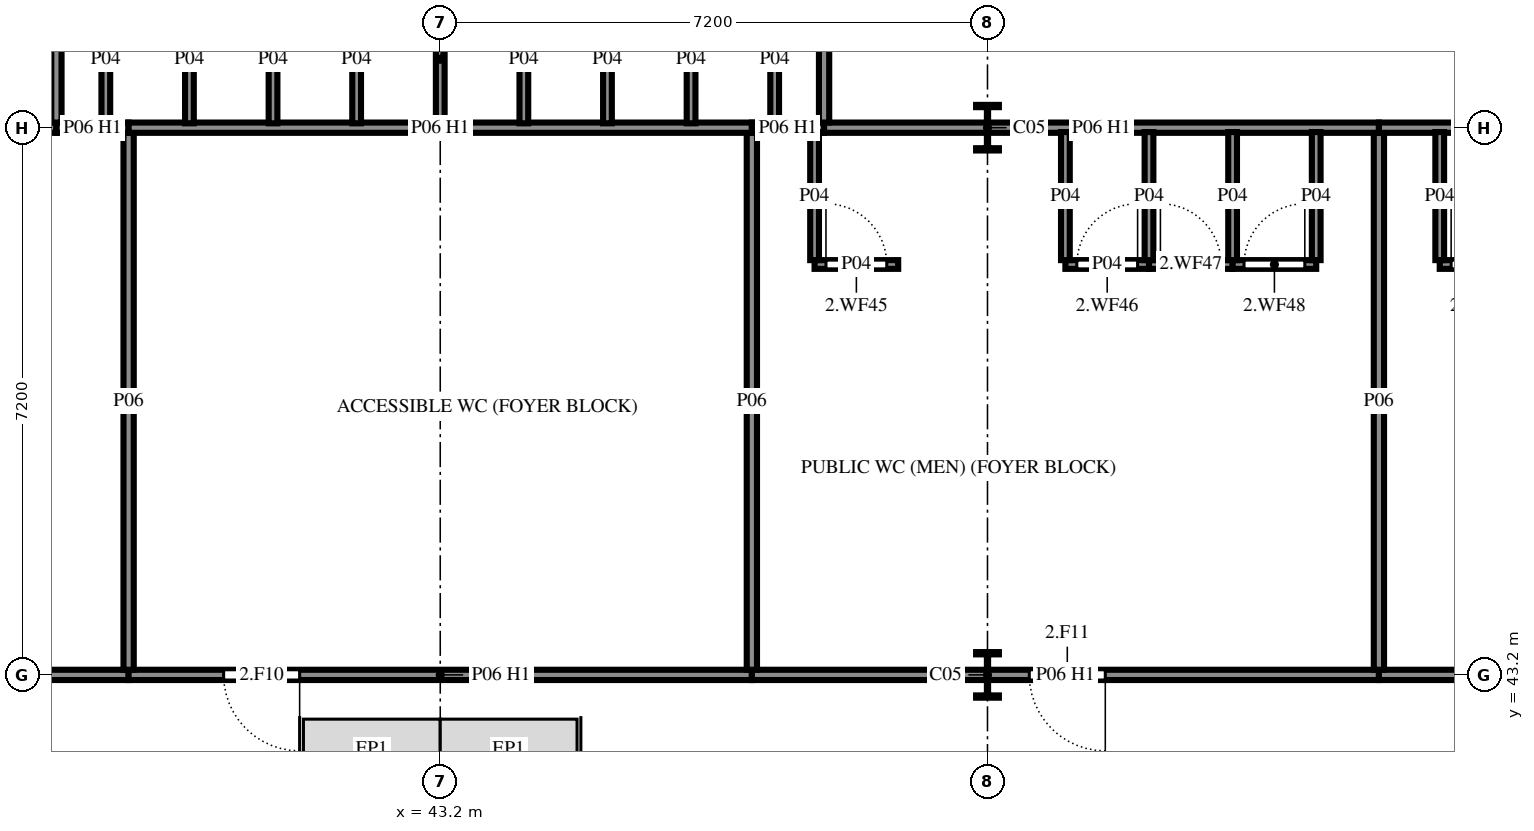
"""IFC4 building model, lengths in metres.
Left out: names, types, materials, properties, quantities, classifications, styles, units other than length and angle.
Written with IfcOpenShell. Run it as: python <this file> out.ifc"""

import sys

from ifc_helpers import new_model, si_unit, direction, frame, frame_2d, origin, origin_2d, place, context, subcontext, project, spatial, rectangle, i_section, extrude, element, fill, save


model = new_model("IFC4")
c1 = context("Model", 3, precision=1e-05, world=origin(), true_north=direction((0.0, 1.0)))
c2 = subcontext(c1, "Body", "Model", "MODEL_VIEW")
j1 = project(units=[si_unit("LENGTHUNIT", "METRE"), si_unit("PLANEANGLEUNIT", "RADIAN")], contexts=[c1])
p1 = place(None, origin())
s1 = spatial("IfcSite", under=j1, at=p1, CompositionType="ELEMENT")
p2 = place(p1, origin())
s2 = spatial("IfcBuilding", under=s1, at=p2, CompositionType="ELEMENT")
p3 = place(p2, frame((0.0, 0.0, 7.2)))
s3 = spatial("IfcBuildingStorey", under=s2, at=p3, CompositionType="ELEMENT", Elevation=7.2)
for number, where, z_axis, x_axis in (
    (1, (50.4, 43.2, 0.0), (0.0, 0.0, 1.0), (1.0, 0.0, 0.0)),
    (2, (50.4, 50.4, 0.0), (0.0, 0.0, 1.0), (1.0, 0.0, 0.0)),
):
    element("IfcColumn", number, at=place(p3, frame(where, z_axis=z_axis, x_axis=x_axis)), inside=s3, PredefinedType="COLUMN", context=c2, shape_type="SweptSolid", body=[
        extrude(i_section(OverallWidth=0.3, OverallDepth=0.6, WebThickness=0.015, FlangeThickness=0.03, FilletRadius=0.027, at=origin_2d()), origin(), (0.0, 0.0, 1.0), 3.6),
    ])
p4 = place(p3, frame((30.85, 43.2, 0.0), z_axis=(0.0, 0.0, 1.0), x_axis=(1.0, 0.0, 0.0)))
e3 = element("IfcWall", 3, at=p4, inside=s3, PredefinedType="PARTITIONING", context=c2, shape_type="SweptSolid", body=[
    extrude(rectangle(XDim=8.25, YDim=0.135, at=frame_2d((4.125, 0.0))), origin(), (0.0, 0.0, 1.0), 2.82),
])
p5 = place(p4, frame((3.65, 0.0, 0.0)))
e4 = element("IfcOpeningElement", 4, at=p5, cuts=e3, PredefinedType="OPENING", context=c2, shape_type="SweptSolid", body=[
    extrude(rectangle(XDim=1.0, YDim=2.4, at=frame_2d((0.5, 1.2))), frame((0.0, 0.077, 0.0), z_axis=(0.0, -1.0, 0.0), x_axis=(1.0, 0.0, 0.0)), (0.0, 0.0, 1.0), 0.155),
])
p6 = place(p3, frame((39.1, 43.2, 0.0), z_axis=(0.0, 0.0, 1.0), x_axis=(1.0, 0.0, 0.0)))
e5 = element("IfcWall", 5, at=p6, inside=s3, PredefinedType="PARTITIONING", context=c2, shape_type="SweptSolid", body=[
    extrude(rectangle(XDim=8.2, YDim=0.135, at=frame_2d((4.1, 0.0))), origin(), (0.0, 0.0, 1.0), 2.82),
])
p7 = place(p6, frame((1.25, 0.0, 0.0)))
e6 = element("IfcOpeningElement", 6, at=p7, cuts=e5, PredefinedType="OPENING", context=c2, shape_type="SweptSolid", body=[
    extrude(rectangle(XDim=1.0, YDim=2.4, at=frame_2d((0.5, 1.2))), frame((0.0, 0.077, 0.0), z_axis=(0.0, -1.0, 0.0), x_axis=(1.0, 0.0, 0.0)), (0.0, 0.0, 1.0), 0.155),
])
p8 = place(p3, frame((47.3, 43.2, 0.0), z_axis=(0.0, 0.0, 1.0), x_axis=(1.0, 0.0, 0.0)))
e7 = element("IfcWall", 7, at=p8, inside=s3, PredefinedType="PARTITIONING", context=c2, shape_type="SweptSolid", body=[
    extrude(rectangle(XDim=8.25, YDim=0.135, at=frame_2d((4.125, 0.0))), origin(), (0.0, 0.0, 1.0), 2.82),
])
p9 = place(p8, frame((3.65, 0.0, 0.0)))
e8 = element("IfcOpeningElement", 8, at=p9, cuts=e7, PredefinedType="OPENING", context=c2, shape_type="SweptSolid", body=[
    extrude(rectangle(XDim=1.0, YDim=2.4, at=frame_2d((0.5, 1.2))), frame((0.0, 0.077, 0.0), z_axis=(0.0, -1.0, 0.0), x_axis=(1.0, 0.0, 0.0)), (0.0, 0.0, 1.0), 0.155),
])
p10 = place(p3, frame((55.55, 43.2, 0.0), z_axis=(0.0, 0.0, 1.0), x_axis=(1.0, 0.0, 0.0)))
e9 = element("IfcWall", 9, at=p10, inside=s3, PredefinedType="PARTITIONING", context=c2, shape_type="SweptSolid", body=[
    extrude(rectangle(XDim=8.2, YDim=0.135, at=frame_2d((4.1, 0.0))), origin(), (0.0, 0.0, 1.0), 2.82),
])
p11 = place(p10, frame((3.65, 0.0, 0.0)))
e10 = element("IfcOpeningElement", 10, at=p11, cuts=e9, PredefinedType="OPENING", context=c2, shape_type="SweptSolid", body=[
    extrude(rectangle(XDim=1.0, YDim=2.4, at=frame_2d((0.5, 1.2))), frame((0.0, 0.077, 0.0), z_axis=(0.0, -1.0, 0.0), x_axis=(1.0, 0.0, 0.0)), (0.0, 0.0, 1.0), 0.155),
])
p12 = place(p3, frame((39.1, 50.333, 0.0), z_axis=(0.0, 0.0, 1.0), x_axis=(0.0, -1.0, 0.0)))
e11 = element("IfcWall", 11, at=p12, inside=s3, PredefinedType="PARTITIONING", context=c2, shape_type="SweptSolid", body=[
    extrude(rectangle(XDim=7.065, YDim=0.135, at=frame_2d((3.532, 0.0))), origin(), (0.0, 0.0, 1.0), 3.42),
])
p13 = place(p3, frame((30.85, 50.4, 0.0), z_axis=(0.0, 0.0, 1.0), x_axis=(1.0, 0.0, 0.0)))
e12 = element("IfcWall", 12, at=p13, inside=s3, PredefinedType="PARTITIONING", context=c2, shape_type="SweptSolid", body=[
    extrude(rectangle(XDim=7.3, YDim=0.135, at=frame_2d((3.65, 0.0))), origin(), (0.0, 0.0, 1.0), 2.82),
])
p14 = place(p3, frame((38.15, 50.4, 0.0), z_axis=(0.0, 0.0, 1.0), x_axis=(1.0, 0.0, 0.0)))
e13 = element("IfcWall", 13, at=p14, inside=s3, PredefinedType="PARTITIONING", context=c2, shape_type="SweptSolid", body=[
    extrude(rectangle(XDim=0.95, YDim=0.135, at=frame_2d((0.475, 0.0))), origin(), (0.0, 0.0, 1.0), 2.82),
])
p15 = place(p3, frame((47.3, 50.333, 0.0), z_axis=(0.0, 0.0, 1.0), x_axis=(0.0, -1.0, 0.0)))
e14 = element("IfcWall", 14, at=p15, inside=s3, PredefinedType="PARTITIONING", context=c2, shape_type="SweptSolid", body=[
    extrude(rectangle(XDim=7.065, YDim=0.135, at=frame_2d((3.532, 0.0))), origin(), (0.0, 0.0, 1.0), 3.42),
])
p16 = place(p3, frame((39.1, 50.4, 0.0), z_axis=(0.0, 0.0, 1.0), x_axis=(1.0, 0.0, 0.0)))
e15 = element("IfcWall", 15, at=p16, inside=s3, PredefinedType="PARTITIONING", context=c2, shape_type="SweptSolid", body=[
    extrude(rectangle(XDim=8.2, YDim=0.135, at=frame_2d((4.1, 0.0))), origin(), (0.0, 0.0, 1.0), 2.82),
])
p17 = place(p3, frame((55.55, 50.333, 0.0), z_axis=(0.0, 0.0, 1.0), x_axis=(0.0, -1.0, 0.0)))
e16 = element("IfcWall", 16, at=p17, inside=s3, PredefinedType="PARTITIONING", context=c2, shape_type="SweptSolid", body=[
    extrude(rectangle(XDim=7.065, YDim=0.135, at=frame_2d((3.532, 0.0))), origin(), (0.0, 0.0, 1.0), 3.42),
])
p18 = place(p3, frame((47.3, 50.4, 0.0), z_axis=(0.0, 0.0, 1.0), x_axis=(1.0, 0.0, 0.0)))
e17 = element("IfcWall", 17, at=p18, inside=s3, PredefinedType="PARTITIONING", context=c2, shape_type="SweptSolid", body=[
    extrude(rectangle(XDim=0.95, YDim=0.135, at=frame_2d((0.475, 0.0))), origin(), (0.0, 0.0, 1.0), 2.82),
])
p19 = place(p3, frame((48.25, 50.4, 0.0), z_axis=(0.0, 0.0, 1.0), x_axis=(1.0, 0.0, 0.0)))
e18 = element("IfcWall", 18, at=p19, inside=s3, PredefinedType="PARTITIONING", context=c2, shape_type="SweptSolid", body=[
    extrude(rectangle(XDim=7.3, YDim=0.135, at=frame_2d((3.65, 0.0))), origin(), (0.0, 0.0, 1.0), 2.82),
])
p20 = place(p3, frame((55.55, 50.4, 0.0), z_axis=(0.0, 0.0, 1.0), x_axis=(1.0, 0.0, 0.0)))
e19 = element("IfcWall", 19, at=p20, inside=s3, PredefinedType="PARTITIONING", context=c2, shape_type="SweptSolid", body=[
    extrude(rectangle(XDim=2.75, YDim=0.135, at=frame_2d((1.375, 0.0))), origin(), (0.0, 0.0, 1.0), 2.82),
])
for number, where, z_axis, x_axis in (
    (20, (38.15, 58.133, 0.0), (0.0, 0.0, 1.0), (0.0, -1.0, 0.0)),
    (21, (48.25, 58.133, 0.0), (0.0, 0.0, 1.0), (0.0, -1.0, 0.0)),
):
    element("IfcWall", number, at=place(p3, frame(where, z_axis=z_axis, x_axis=x_axis)), inside=s3, PredefinedType="PARTITIONING", context=c2, shape_type="SweptSolid", body=[
        extrude(rectangle(XDim=7.665, YDim=0.135, at=frame_2d((3.833, 0.0))), origin(), (0.0, 0.0, 1.0), 3.42),
    ])
p21 = place(p3, frame((48.125, 48.6, 0.0), z_axis=(0.0, 0.0, 1.0), x_axis=(1.0, 0.0, 0.0)))
e22 = element("IfcWall", 22, at=p21, inside=s3, PredefinedType="PARTITIONING", context=c2, shape_type="SweptSolid", body=[
    extrude(rectangle(XDim=1.1, YDim=0.115, at=frame_2d((0.55, 0.0))), origin(), (0.0, 0.0, 1.0), 3.42),
])
p22 = place(p21, frame((0.15, 0.0, 0.0)))
e23 = element("IfcOpeningElement", 23, at=p22, cuts=e22, PredefinedType="OPENING", context=c2, shape_type="SweptSolid", body=[
    extrude(rectangle(XDim=0.8, YDim=2.1, at=frame_2d((0.4, 1.05))), frame((0.0, 0.067, 0.0), z_axis=(0.0, -1.0, 0.0), x_axis=(1.0, 0.0, 0.0)), (0.0, 0.0, 1.0), 0.135),
])
p23 = place(p3, frame((48.125, 50.343, 0.0), z_axis=(0.0, 0.0, 1.0), x_axis=(0.0, -1.0, 0.0)))
e24 = element("IfcWall", 24, at=p23, inside=s3, PredefinedType="PARTITIONING", context=c2, shape_type="SweptSolid", body=[
    extrude(rectangle(XDim=1.685, YDim=0.115, at=frame_2d((0.843, 0.0))), origin(), (0.0, 0.0, 1.0), 3.42),
])
p24 = place(p3, frame((51.425, 48.6, 0.0), z_axis=(0.0, 0.0, 1.0), x_axis=(1.0, 0.0, 0.0)))
e25 = element("IfcWall", 25, at=p24, inside=s3, PredefinedType="PARTITIONING", context=c2, shape_type="SweptSolid", body=[
    extrude(rectangle(XDim=1.1, YDim=0.115, at=frame_2d((0.55, 0.0))), origin(), (0.0, 0.0, 1.0), 3.42),
])
p25 = place(p24, frame((0.15, 0.0, 0.0)))
e26 = element("IfcOpeningElement", 26, at=p25, cuts=e25, PredefinedType="OPENING", context=c2, shape_type="SweptSolid", body=[
    extrude(rectangle(XDim=0.8, YDim=2.1, at=frame_2d((0.4, 1.05))), frame((0.0, 0.067, 0.0), z_axis=(0.0, -1.0, 0.0), x_axis=(1.0, 0.0, 0.0)), (0.0, 0.0, 1.0), 0.135),
])
p26 = place(p3, frame((51.425, 50.343, 0.0), z_axis=(0.0, 0.0, 1.0), x_axis=(0.0, -1.0, 0.0)))
e27 = element("IfcWall", 27, at=p26, inside=s3, PredefinedType="PARTITIONING", context=c2, shape_type="SweptSolid", body=[
    extrude(rectangle(XDim=1.685, YDim=0.115, at=frame_2d((0.843, 0.0))), origin(), (0.0, 0.0, 1.0), 3.42),
])
p27 = place(p3, frame((52.525, 48.6, 0.0), z_axis=(0.0, 0.0, 1.0), x_axis=(1.0, 0.0, 0.0)))
e28 = element("IfcWall", 28, at=p27, inside=s3, PredefinedType="PARTITIONING", context=c2, shape_type="SweptSolid", body=[
    extrude(rectangle(XDim=1.1, YDim=0.115, at=frame_2d((0.55, 0.0))), origin(), (0.0, 0.0, 1.0), 3.42),
])
p28 = place(p27, frame((0.15, 0.0, 0.0)))
e29 = element("IfcOpeningElement", 29, at=p28, cuts=e28, PredefinedType="OPENING", context=c2, shape_type="SweptSolid", body=[
    extrude(rectangle(XDim=0.8, YDim=2.1, at=frame_2d((0.4, 1.05))), frame((0.0, 0.067, 0.0), z_axis=(0.0, -1.0, 0.0), x_axis=(1.0, 0.0, 0.0)), (0.0, 0.0, 1.0), 0.135),
])
p29 = place(p3, frame((52.525, 50.343, 0.0), z_axis=(0.0, 0.0, 1.0), x_axis=(0.0, -1.0, 0.0)))
e30 = element("IfcWall", 30, at=p29, inside=s3, PredefinedType="PARTITIONING", context=c2, shape_type="SweptSolid", body=[
    extrude(rectangle(XDim=1.685, YDim=0.115, at=frame_2d((0.843, 0.0))), origin(), (0.0, 0.0, 1.0), 3.42),
])
p30 = place(p3, frame((53.625, 48.6, 0.0), z_axis=(0.0, 0.0, 1.0), x_axis=(1.0, 0.0, 0.0)))
e31 = element("IfcWall", 31, at=p30, inside=s3, PredefinedType="PARTITIONING", context=c2, shape_type="SweptSolid", body=[
    extrude(rectangle(XDim=1.1, YDim=0.115, at=frame_2d((0.55, 0.0))), origin(), (0.0, 0.0, 1.0), 3.42),
])
p31 = place(p30, frame((0.15, 0.0, 0.0)))
e32 = element("IfcOpeningElement", 32, at=p31, cuts=e31, PredefinedType="OPENING", context=c2, shape_type="SweptSolid", body=[
    extrude(rectangle(XDim=0.8, YDim=2.1, at=frame_2d((0.4, 1.05))), frame((0.0, 0.067, 0.0), z_axis=(0.0, -1.0, 0.0), x_axis=(1.0, 0.0, 0.0)), (0.0, 0.0, 1.0), 0.135),
])
for number, where, z_axis, x_axis in (
    (33, (53.625, 50.343, 0.0), (0.0, 0.0, 1.0), (0.0, -1.0, 0.0)),
    (34, (54.725, 50.343, 0.0), (0.0, 0.0, 1.0), (0.0, -1.0, 0.0)),
):
    element("IfcWall", number, at=place(p3, frame(where, z_axis=z_axis, x_axis=x_axis)), inside=s3, PredefinedType="PARTITIONING", context=c2, shape_type="SweptSolid", body=[
        extrude(rectangle(XDim=1.685, YDim=0.115, at=frame_2d((0.843, 0.0))), origin(), (0.0, 0.0, 1.0), 3.42),
    ])
p32 = place(p3, frame((56.35, 48.6, 0.0), z_axis=(0.0, 0.0, 1.0), x_axis=(1.0, 0.0, 0.0)))
e35 = element("IfcWall", 35, at=p32, inside=s3, PredefinedType="PARTITIONING", context=c2, shape_type="SweptSolid", body=[
    extrude(rectangle(XDim=1.1, YDim=0.115, at=frame_2d((0.55, 0.0))), origin(), (0.0, 0.0, 1.0), 3.42),
])
p33 = place(p32, frame((0.15, 0.0, 0.0)))
e36 = element("IfcOpeningElement", 36, at=p33, cuts=e35, PredefinedType="OPENING", context=c2, shape_type="SweptSolid", body=[
    extrude(rectangle(XDim=0.8, YDim=2.1, at=frame_2d((0.4, 1.05))), frame((0.0, 0.067, 0.0), z_axis=(0.0, -1.0, 0.0), x_axis=(1.0, 0.0, 0.0)), (0.0, 0.0, 1.0), 0.135),
])
for number, where, z_axis, x_axis in (
    (37, (56.35, 50.343, 0.0), (0.0, 0.0, 1.0), (0.0, -1.0, 0.0)),
    (38, (38.8, 50.458, 0.0), (0.0, 0.0, 1.0), (0.0, 1.0, 0.0)),
    (39, (39.9, 50.458, 0.0), (0.0, 0.0, 1.0), (0.0, 1.0, 0.0)),
    (40, (41.0, 50.458, 0.0), (0.0, 0.0, 1.0), (0.0, 1.0, 0.0)),
    (41, (42.1, 50.458, 0.0), (0.0, 0.0, 1.0), (0.0, 1.0, 0.0)),
):
    element("IfcWall", number, at=place(p3, frame(where, z_axis=z_axis, x_axis=x_axis)), inside=s3, PredefinedType="PARTITIONING", context=c2, shape_type="SweptSolid", body=[
        extrude(rectangle(XDim=1.685, YDim=0.115, at=frame_2d((0.843, 0.0))), origin(), (0.0, 0.0, 1.0), 3.42),
    ])
p34 = place(p3, frame((43.2, 50.458, 0.0), z_axis=(0.0, 0.0, 1.0), x_axis=(0.0, 1.0, 0.0)))
e42 = element("IfcWall", 42, at=p34, inside=s3, PredefinedType="PARTITIONING", context=c2, shape_type="SweptSolid", body=[
    extrude(rectangle(XDim=1.685, YDim=0.115, at=frame_2d((0.843, 0.0))), origin(), (0.0, 0.0, 1.0), 3.12),
])
for number, where, z_axis, x_axis in (
    (43, (44.3, 50.458, 0.0), (0.0, 0.0, 1.0), (0.0, 1.0, 0.0)),
    (44, (45.4, 50.458, 0.0), (0.0, 0.0, 1.0), (0.0, 1.0, 0.0)),
    (45, (46.5, 50.458, 0.0), (0.0, 0.0, 1.0), (0.0, 1.0, 0.0)),
    (46, (47.6, 50.458, 0.0), (0.0, 0.0, 1.0), (0.0, 1.0, 0.0)),
):
    element("IfcWall", number, at=place(p3, frame(where, z_axis=z_axis, x_axis=x_axis)), inside=s3, PredefinedType="PARTITIONING", context=c2, shape_type="SweptSolid", body=[
        extrude(rectangle(XDim=1.685, YDim=0.115, at=frame_2d((0.843, 0.0))), origin(), (0.0, 0.0, 1.0), 3.42),
    ])
p35 = place(p7, frame((1.0, 0.0, 0.0), z_axis=(0.0, 0.0, 1.0), x_axis=(-1.0, 0.0, 0.0)))
e47 = element("IfcDoor", 47, at=p35, inside=s3, OperationType="SINGLE_SWING_RIGHT", PredefinedType="DOOR", context=c2, shape_type="SweptSolid", body=[
    extrude(rectangle(XDim=1.0, YDim=2.4, at=frame_2d((0.5, 1.2))), frame((0.0, 0.025, 0.0), z_axis=(0.0, -1.0, 0.0), x_axis=(1.0, 0.0, 0.0)), (0.0, 0.0, 1.0), 0.05),
])
fill(e6, e47)
p36 = place(p9, frame((1.0, 0.0, 0.0), z_axis=(0.0, 0.0, 1.0), x_axis=(-1.0, 0.0, 0.0)))
e48 = element("IfcDoor", 48, at=p36, inside=s3, OperationType="SINGLE_SWING_RIGHT", PredefinedType="DOOR", context=c2, shape_type="SweptSolid", body=[
    extrude(rectangle(XDim=1.0, YDim=2.4, at=frame_2d((0.5, 1.2))), frame((0.0, 0.025, 0.0), z_axis=(0.0, -1.0, 0.0), x_axis=(1.0, 0.0, 0.0)), (0.0, 0.0, 1.0), 0.05),
])
fill(e8, e48)
p37 = place(p22, origin())
e49 = element("IfcDoor", 49, at=p37, inside=s3, OperationType="SINGLE_SWING_RIGHT", PredefinedType="DOOR", context=c2, shape_type="SweptSolid", body=[
    extrude(rectangle(XDim=0.8, YDim=2.1, at=frame_2d((0.4, 1.05))), frame((0.0, 0.025, 0.0), z_axis=(0.0, -1.0, 0.0), x_axis=(1.0, 0.0, 0.0)), (0.0, 0.0, 1.0), 0.05),
])
fill(e23, e49)
p38 = place(p25, origin())
e50 = element("IfcDoor", 50, at=p38, inside=s3, OperationType="SINGLE_SWING_LEFT", PredefinedType="DOOR", context=c2, shape_type="SweptSolid", body=[
    extrude(rectangle(XDim=0.8, YDim=2.1, at=frame_2d((0.4, 1.05))), frame((0.0, 0.025, 0.0), z_axis=(0.0, -1.0, 0.0), x_axis=(1.0, 0.0, 0.0)), (0.0, 0.0, 1.0), 0.05),
])
fill(e26, e50)
p39 = place(p28, origin())
e51 = element("IfcDoor", 51, at=p39, inside=s3, OperationType="SINGLE_SWING_RIGHT", PredefinedType="DOOR", context=c2, shape_type="SweptSolid", body=[
    extrude(rectangle(XDim=0.8, YDim=2.1, at=frame_2d((0.4, 1.05))), frame((0.0, 0.025, 0.0), z_axis=(0.0, -1.0, 0.0), x_axis=(1.0, 0.0, 0.0)), (0.0, 0.0, 1.0), 0.05),
])
fill(e29, e51)
p40 = place(p31, origin())
e52 = element("IfcDoor", 52, at=p40, inside=s3, OperationType="SINGLE_SWING_LEFT", PredefinedType="DOOR", context=c2, shape_type="SweptSolid", body=[
    extrude(rectangle(XDim=0.8, YDim=2.1, at=frame_2d((0.4, 1.05))), frame((0.0, 0.025, 0.0), z_axis=(0.0, -1.0, 0.0), x_axis=(1.0, 0.0, 0.0)), (0.0, 0.0, 1.0), 0.05),
])
fill(e32, e52)
p41 = place(p33, origin())
e53 = element("IfcDoor", 53, at=p41, inside=s3, OperationType="SINGLE_SWING_RIGHT", PredefinedType="DOOR", context=c2, shape_type="SweptSolid", body=[
    extrude(rectangle(XDim=0.8, YDim=2.1, at=frame_2d((0.4, 1.05))), frame((0.0, 0.025, 0.0), z_axis=(0.0, -1.0, 0.0), x_axis=(1.0, 0.0, 0.0)), (0.0, 0.0, 1.0), 0.05),
])
fill(e36, e53)
save(model, sys.argv[1])
